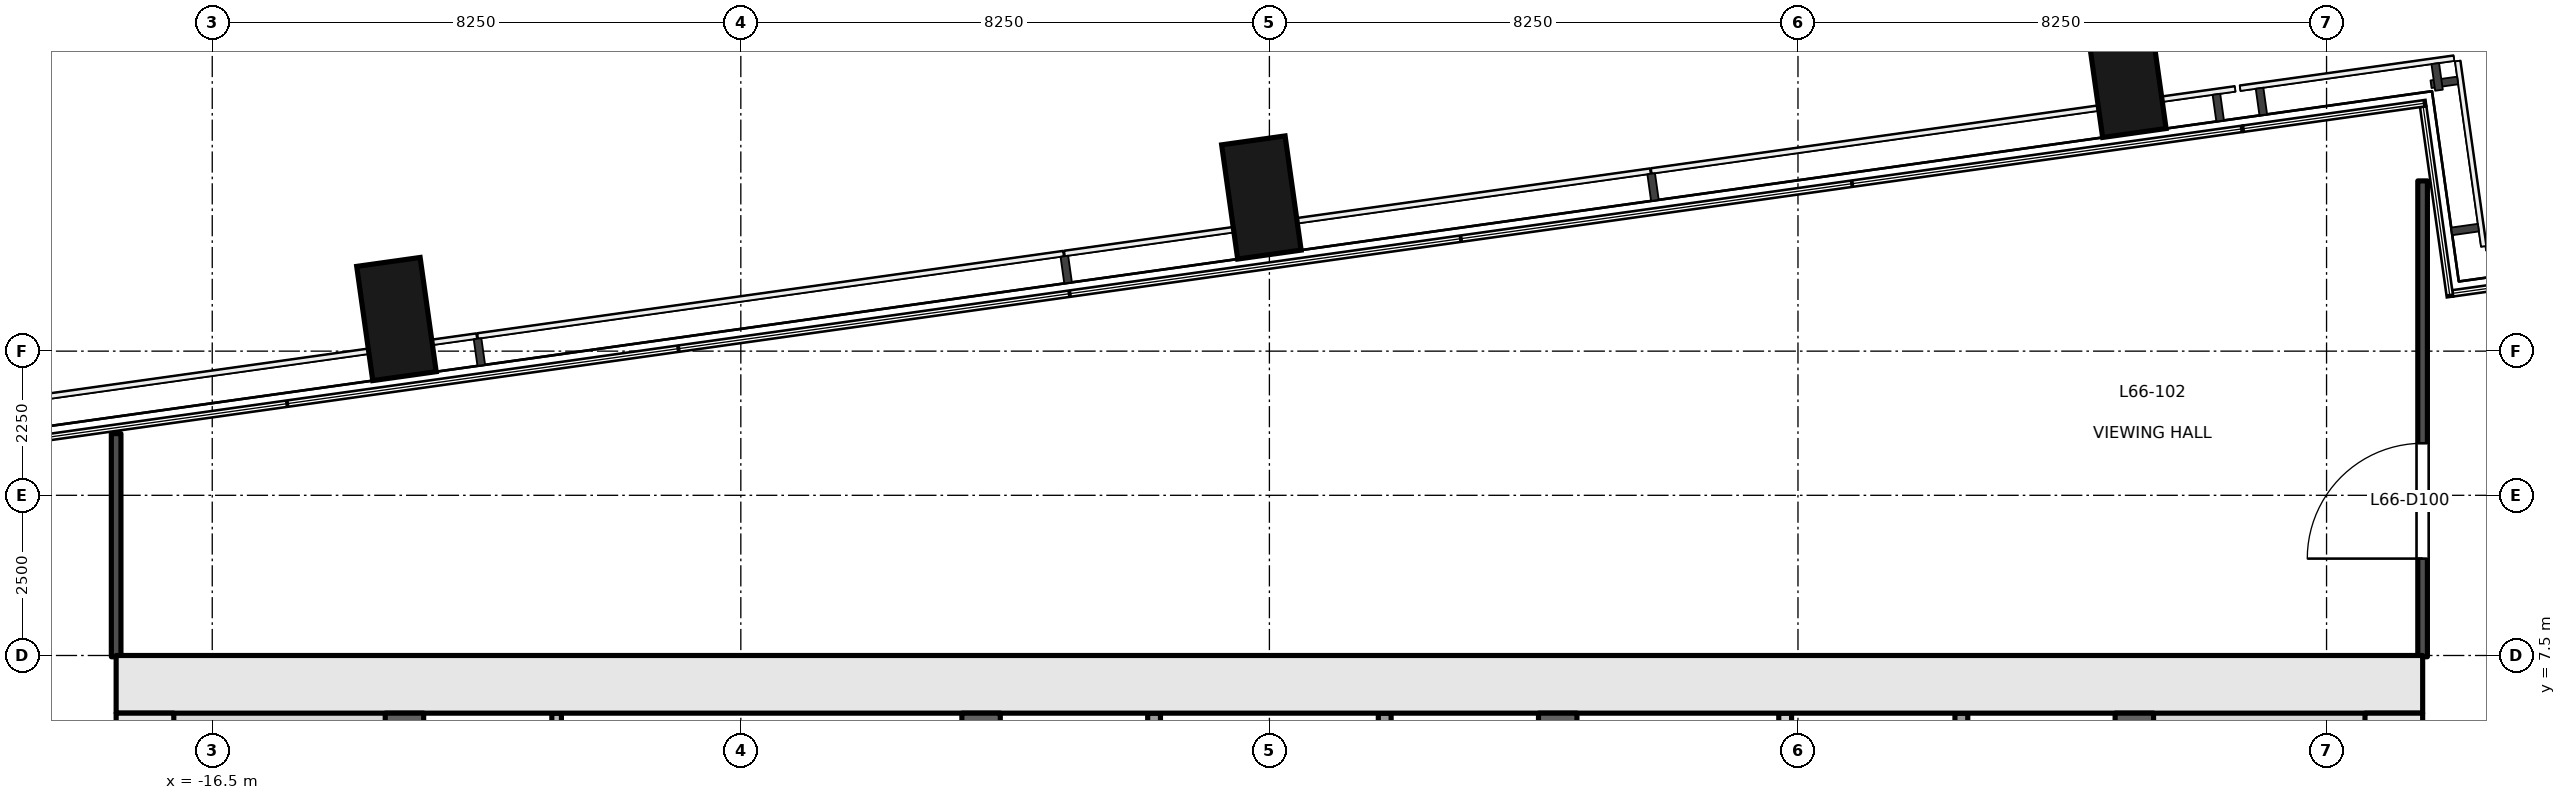
"""IFC4 building model, lengths in metres.
Left out: names, types, materials, properties, quantities, classifications, styles, units other than length and angle.
Written with IfcOpenShell. Run it as: python <this file> out.ifc"""

import sys

from ifc_helpers import new_model, si_unit, direction, frame, frame_2d, origin, origin_2d, place, context, subcontext, project, spatial, rectangle, extrude, element, fill, save


model = new_model("IFC4")
c1 = context("Model", 3, precision=1e-05, world=origin(), true_north=direction((0.0, 1.0)))
c2 = subcontext(c1, "Body", "Model", "MODEL_VIEW")
j1 = project(units=[si_unit("LENGTHUNIT", "METRE"), si_unit("PLANEANGLEUNIT", "RADIAN")], contexts=[c1])
p1 = place(None, origin())
s1 = spatial("IfcSite", under=j1, at=p1, CompositionType="ELEMENT")
p2 = place(p1, origin())
s2 = spatial("IfcBuilding", under=s1, at=p2, CompositionType="ELEMENT")
p3 = place(p2, frame((0.0, 0.0, 286.3)))
s3 = spatial("IfcBuildingStorey", under=s2, at=p3, CompositionType="ELEMENT", Elevation=286.3)
for number, where, z_axis, x_axis in (
    (1, (-13.625, 12.751, -0.2), (0.0, 0.0, 1.0), (0.99, 0.139, 0.0)),
    (2, (-0.125, 14.648, -0.2), (0.0, 0.0, 1.0), (0.99, 0.139, 0.0)),
    (3, (13.375, 16.546, -0.2), (0.0, 0.0, 1.0), (0.99, 0.139, 0.0)),
):
    element("IfcColumn", number, at=place(p3, frame(where, z_axis=z_axis, x_axis=x_axis)), inside=s3, PredefinedType="COLUMN", context=c2, shape_type="SweptSolid", body=[
        extrude(rectangle(XDim=1.0, YDim=1.8, at=origin_2d()), origin(), (0.0, 0.0, 1.0), 6.0),
    ])
p4 = place(p3, frame((-18.0, 7.05, -0.2), z_axis=(0.0, 0.0, 1.0), x_axis=(1.0, 0.0, 0.0)))
e4 = element("IfcWall", 4, at=p4, inside=s3, PredefinedType="SHEAR", context=c2, shape_type="SweptSolid", body=[
    extrude(rectangle(XDim=36.0, YDim=0.9, at=frame_2d((18.0, 0.0))), origin(), (0.0, 0.0, 1.0), 6.0),
])
p5 = place(p3, frame((-17.55, -6.6, -0.2), z_axis=(0.0, 0.0, 1.0), x_axis=(0.0, 1.0, 0.0)))
e5 = element("IfcWall", 5, at=p5, inside=s3, PredefinedType="SHEAR", context=c2, shape_type="SweptSolid", body=[
    extrude(rectangle(XDim=13.2, YDim=0.9, at=frame_2d((6.6, 0.0))), origin(), (0.0, 0.0, 1.0), 6.0),
])
p6 = place(p5, frame((4.55, 0.0, 0.2)))
e6 = element("IfcOpeningElement", 6, at=p6, cuts=e5, PredefinedType="OPENING", context=c2, shape_type="SweptSolid", body=[
    extrude(rectangle(XDim=1.2, YDim=2.1, at=frame_2d((0.6, 1.05))), frame((0.0, 0.46, 0.0), z_axis=(0.0, -1.0, 0.0), x_axis=(1.0, 0.0, 0.0)), (0.0, 0.0, 1.0), 0.921),
])
p7 = place(p3, frame((17.55, -6.6, -0.2), z_axis=(0.0, 0.0, 1.0), x_axis=(0.0, 1.0, 0.0)))
e7 = element("IfcWall", 7, at=p7, inside=s3, PredefinedType="SHEAR", context=c2, shape_type="SweptSolid", body=[
    extrude(rectangle(XDim=13.2, YDim=0.9, at=frame_2d((6.6, 0.0))), origin(), (0.0, 0.0, 1.0), 6.0),
])
p8 = place(p7, frame((4.55, 0.0, 0.2)))
e8 = element("IfcOpeningElement", 8, at=p8, cuts=e7, PredefinedType="OPENING", context=c2, shape_type="SweptSolid", body=[
    extrude(rectangle(XDim=1.2, YDim=2.1, at=frame_2d((0.6, 1.05))), frame((0.0, 0.46, 0.0), z_axis=(0.0, -1.0, 0.0), x_axis=(1.0, 0.0, 0.0)), (0.0, 0.0, 1.0), 0.921),
])
for number, where, z_axis, x_axis in (
    (9, (-13.5, -6.6, -0.2), (0.0, 0.0, 1.0), (0.0, 1.0, 0.0)),
    (10, (-4.5, -6.6, -0.2), (0.0, 0.0, 1.0), (0.0, 1.0, 0.0)),
    (11, (4.5, -6.6, -0.2), (0.0, 0.0, 1.0), (0.0, 1.0, 0.0)),
    (12, (13.5, -6.6, -0.2), (0.0, 0.0, 1.0), (0.0, 1.0, 0.0)),
):
    element("IfcWall", number, at=place(p3, frame(where, z_axis=z_axis, x_axis=x_axis)), inside=s3, PredefinedType="SHEAR", context=c2, shape_type="SweptSolid", body=[
        extrude(rectangle(XDim=13.2, YDim=0.6, at=frame_2d((6.6, 0.0))), origin(), (0.0, 0.0, 1.0), 6.0),
    ])
p9 = place(p3, frame((-11.125, -6.6, 0.0), z_axis=(0.0, 0.0, 1.0), x_axis=(0.0, 1.0, 0.0)))
e13 = element("IfcWall", 13, at=p9, inside=s3, PredefinedType="PARTITIONING", context=c2, shape_type="SweptSolid", body=[
    extrude(rectangle(XDim=13.2, YDim=0.15, at=frame_2d((6.6, 0.0))), origin(), (0.0, 0.0, 1.0), 5.8),
])
p10 = place(p9, frame((2.52, 0.0, 0.0)))
e14 = element("IfcOpeningElement", 14, at=p10, cuts=e13, PredefinedType="OPENING", context=c2, shape_type="SweptSolid", body=[
    extrude(rectangle(XDim=0.9, YDim=2.1, at=frame_2d((0.45, 1.05))), frame((0.0, 0.085, 0.0), z_axis=(0.0, -1.0, 0.0), x_axis=(1.0, 0.0, 0.0)), (0.0, 0.0, 1.0), 0.171),
])
p11 = place(p9, frame((9.12, 0.0, 0.0)))
e15 = element("IfcOpeningElement", 15, at=p11, cuts=e13, PredefinedType="OPENING", context=c2, shape_type="SweptSolid", body=[
    extrude(rectangle(XDim=0.9, YDim=2.1, at=frame_2d((0.45, 1.05))), frame((0.0, 0.085, 0.0), z_axis=(0.0, -1.0, 0.0), x_axis=(1.0, 0.0, 0.0)), (0.0, 0.0, 1.0), 0.171),
])
p12 = place(p3, frame((-1.8, -6.6, 0.0), z_axis=(0.0, 0.0, 1.0), x_axis=(0.0, 1.0, 0.0)))
e16 = element("IfcWall", 16, at=p12, inside=s3, PredefinedType="PARTITIONING", context=c2, shape_type="SweptSolid", body=[
    extrude(rectangle(XDim=13.2, YDim=0.2, at=frame_2d((6.6, 0.0))), origin(), (0.0, 0.0, 1.0), 5.8),
])
p13 = place(p12, frame((0.55, 0.0, 0.0)))
e17 = element("IfcOpeningElement", 17, at=p13, cuts=e16, PredefinedType="OPENING", context=c2, shape_type="SweptSolid", body=[
    extrude(rectangle(XDim=0.9, YDim=2.1, at=frame_2d((0.45, 1.05))), frame((0.0, 0.111, 0.0), z_axis=(0.0, -1.0, 0.0), x_axis=(1.0, 0.0, 0.0)), (0.0, 0.0, 1.0), 0.221),
])
p14 = place(p12, frame((2.9, 0.0, 0.0)))
e18 = element("IfcOpeningElement", 18, at=p14, cuts=e16, PredefinedType="OPENING", context=c2, shape_type="SweptSolid", body=[
    extrude(rectangle(XDim=1.2, YDim=2.1, at=frame_2d((0.6, 1.05))), frame((0.0, 0.111, 0.0), z_axis=(0.0, -1.0, 0.0), x_axis=(1.0, 0.0, 0.0)), (0.0, 0.0, 1.0), 0.221),
])
p15 = place(p12, frame((5.7, 0.0, 0.0)))
e19 = element("IfcOpeningElement", 19, at=p15, cuts=e16, PredefinedType="OPENING", context=c2, shape_type="SweptSolid", body=[
    extrude(rectangle(XDim=1.2, YDim=2.1, at=frame_2d((0.6, 1.05))), frame((0.0, 0.111, 0.0), z_axis=(0.0, -1.0, 0.0), x_axis=(1.0, 0.0, 0.0)), (0.0, 0.0, 1.0), 0.221),
])
p16 = place(p12, frame((8.5, 0.0, 0.0)))
e20 = element("IfcOpeningElement", 20, at=p16, cuts=e16, PredefinedType="OPENING", context=c2, shape_type="SweptSolid", body=[
    extrude(rectangle(XDim=1.2, YDim=2.1, at=frame_2d((0.6, 1.05))), frame((0.0, 0.111, 0.0), z_axis=(0.0, -1.0, 0.0), x_axis=(1.0, 0.0, 0.0)), (0.0, 0.0, 1.0), 0.221),
])
p17 = place(p12, frame((11.3, 0.0, 0.0)))
e21 = element("IfcOpeningElement", 21, at=p17, cuts=e16, PredefinedType="OPENING", context=c2, shape_type="SweptSolid", body=[
    extrude(rectangle(XDim=1.2, YDim=2.1, at=frame_2d((0.6, 1.05))), frame((0.0, 0.111, 0.0), z_axis=(0.0, -1.0, 0.0), x_axis=(1.0, 0.0, 0.0)), (0.0, 0.0, 1.0), 0.221),
])
p18 = place(p3, frame((1.8, -6.6, 0.0), z_axis=(0.0, 0.0, 1.0), x_axis=(0.0, 1.0, 0.0)))
e22 = element("IfcWall", 22, at=p18, inside=s3, PredefinedType="PARTITIONING", context=c2, shape_type="SweptSolid", body=[
    extrude(rectangle(XDim=13.2, YDim=0.2, at=frame_2d((6.6, 0.0))), origin(), (0.0, 0.0, 1.0), 5.8),
])
p19 = place(p18, frame((0.55, 0.0, 0.0)))
e23 = element("IfcOpeningElement", 23, at=p19, cuts=e22, PredefinedType="OPENING", context=c2, shape_type="SweptSolid", body=[
    extrude(rectangle(XDim=0.9, YDim=2.1, at=frame_2d((0.45, 1.05))), frame((0.0, 0.111, 0.0), z_axis=(0.0, -1.0, 0.0), x_axis=(1.0, 0.0, 0.0)), (0.0, 0.0, 1.0), 0.221),
])
p20 = place(p18, frame((2.9, 0.0, 0.0)))
e24 = element("IfcOpeningElement", 24, at=p20, cuts=e22, PredefinedType="OPENING", context=c2, shape_type="SweptSolid", body=[
    extrude(rectangle(XDim=1.2, YDim=2.1, at=frame_2d((0.6, 1.05))), frame((0.0, 0.111, 0.0), z_axis=(0.0, -1.0, 0.0), x_axis=(1.0, 0.0, 0.0)), (0.0, 0.0, 1.0), 0.221),
])
p21 = place(p18, frame((5.7, 0.0, 0.0)))
e25 = element("IfcOpeningElement", 25, at=p21, cuts=e22, PredefinedType="OPENING", context=c2, shape_type="SweptSolid", body=[
    extrude(rectangle(XDim=1.2, YDim=2.1, at=frame_2d((0.6, 1.05))), frame((0.0, 0.111, 0.0), z_axis=(0.0, -1.0, 0.0), x_axis=(1.0, 0.0, 0.0)), (0.0, 0.0, 1.0), 0.221),
])
p22 = place(p18, frame((8.5, 0.0, 0.0)))
e26 = element("IfcOpeningElement", 26, at=p22, cuts=e22, PredefinedType="OPENING", context=c2, shape_type="SweptSolid", body=[
    extrude(rectangle(XDim=1.2, YDim=2.1, at=frame_2d((0.6, 1.05))), frame((0.0, 0.111, 0.0), z_axis=(0.0, -1.0, 0.0), x_axis=(1.0, 0.0, 0.0)), (0.0, 0.0, 1.0), 0.221),
])
p23 = place(p18, frame((11.3, 0.0, 0.0)))
e27 = element("IfcOpeningElement", 27, at=p23, cuts=e22, PredefinedType="OPENING", context=c2, shape_type="SweptSolid", body=[
    extrude(rectangle(XDim=1.2, YDim=2.1, at=frame_2d((0.6, 1.05))), frame((0.0, 0.111, 0.0), z_axis=(0.0, -1.0, 0.0), x_axis=(1.0, 0.0, 0.0)), (0.0, 0.0, 1.0), 0.221),
])
p24 = place(p3, frame((8.05, -6.6, 0.0), z_axis=(0.0, 0.0, 1.0), x_axis=(0.0, 1.0, 0.0)))
e28 = element("IfcWall", 28, at=p24, inside=s3, PredefinedType="PARTITIONING", context=c2, shape_type="SweptSolid", body=[
    extrude(rectangle(XDim=13.2, YDim=0.2, at=frame_2d((6.6, 0.0))), origin(), (0.0, 0.0, 1.0), 5.8),
])
p25 = place(p24, frame((1.386, 0.0, 0.0)))
e29 = element("IfcOpeningElement", 29, at=p25, cuts=e28, PredefinedType="OPENING", context=c2, shape_type="SweptSolid", body=[
    extrude(rectangle(XDim=0.9, YDim=2.1, at=frame_2d((0.45, 1.05))), frame((0.0, 0.111, 0.0), z_axis=(0.0, -1.0, 0.0), x_axis=(1.0, 0.0, 0.0)), (0.0, 0.0, 1.0), 0.221),
])
p26 = place(p24, frame((4.786, 0.0, 0.0)))
e30 = element("IfcOpeningElement", 30, at=p26, cuts=e28, PredefinedType="OPENING", context=c2, shape_type="SweptSolid", body=[
    extrude(rectangle(XDim=0.9, YDim=2.1, at=frame_2d((0.45, 1.05))), frame((0.0, 0.111, 0.0), z_axis=(0.0, -1.0, 0.0), x_axis=(1.0, 0.0, 0.0)), (0.0, 0.0, 1.0), 0.221),
])
p27 = place(p24, frame((11.9, 0.0, 0.0)))
e31 = element("IfcOpeningElement", 31, at=p27, cuts=e28, PredefinedType="OPENING", context=c2, shape_type="SweptSolid", body=[
    extrude(rectangle(XDim=1.1, YDim=2.1, at=frame_2d((0.55, 1.05))), frame((0.0, 0.111, 0.0), z_axis=(0.0, -1.0, 0.0), x_axis=(1.0, 0.0, 0.0)), (0.0, 0.0, 1.0), 0.221),
])
p28 = place(p3, frame((10.8, -6.6, 0.0), z_axis=(0.0, 0.0, 1.0), x_axis=(0.0, 1.0, 0.0)))
e32 = element("IfcWall", 32, at=p28, inside=s3, PredefinedType="PARTITIONING", context=c2, shape_type="SweptSolid", body=[
    extrude(rectangle(XDim=13.2, YDim=0.2, at=frame_2d((6.6, 0.0))), origin(), (0.0, 0.0, 1.0), 5.8),
])
p29 = place(p28, frame((0.7, 0.0, 0.0)))
e33 = element("IfcOpeningElement", 33, at=p29, cuts=e32, PredefinedType="OPENING", context=c2, shape_type="SweptSolid", body=[
    extrude(rectangle(XDim=1.2, YDim=2.1, at=frame_2d((0.6, 1.05))), frame((0.0, 0.111, 0.0), z_axis=(0.0, -1.0, 0.0), x_axis=(1.0, 0.0, 0.0)), (0.0, 0.0, 1.0), 0.221),
])
p30 = place(p28, frame((3.5, 0.0, 0.0)))
e34 = element("IfcOpeningElement", 34, at=p30, cuts=e32, PredefinedType="OPENING", context=c2, shape_type="SweptSolid", body=[
    extrude(rectangle(XDim=1.2, YDim=2.1, at=frame_2d((0.6, 1.05))), frame((0.0, 0.111, 0.0), z_axis=(0.0, -1.0, 0.0), x_axis=(1.0, 0.0, 0.0)), (0.0, 0.0, 1.0), 0.221),
])
p31 = place(p28, frame((6.3, 0.0, 0.0)))
e35 = element("IfcOpeningElement", 35, at=p31, cuts=e32, PredefinedType="OPENING", context=c2, shape_type="SweptSolid", body=[
    extrude(rectangle(XDim=1.2, YDim=2.1, at=frame_2d((0.6, 1.05))), frame((0.0, 0.111, 0.0), z_axis=(0.0, -1.0, 0.0), x_axis=(1.0, 0.0, 0.0)), (0.0, 0.0, 1.0), 0.221),
])
p32 = place(p28, frame((8.742, 0.0, 0.0)))
e36 = element("IfcOpeningElement", 36, at=p32, cuts=e32, PredefinedType="OPENING", context=c2, shape_type="SweptSolid", body=[
    extrude(rectangle(XDim=0.9, YDim=2.1, at=frame_2d((0.45, 1.05))), frame((0.0, 0.111, 0.0), z_axis=(0.0, -1.0, 0.0), x_axis=(1.0, 0.0, 0.0)), (0.0, 0.0, 1.0), 0.221),
])
p33 = place(p28, frame((10.326, 0.0, 0.0)))
e37 = element("IfcOpeningElement", 37, at=p33, cuts=e32, PredefinedType="OPENING", context=c2, shape_type="SweptSolid", body=[
    extrude(rectangle(XDim=0.9, YDim=2.1, at=frame_2d((0.45, 1.05))), frame((0.0, 0.111, 0.0), z_axis=(0.0, -1.0, 0.0), x_axis=(1.0, 0.0, 0.0)), (0.0, 0.0, 1.0), 0.221),
])
p34 = place(p28, frame((11.934, 0.0, 0.0)))
e38 = element("IfcOpeningElement", 38, at=p34, cuts=e32, PredefinedType="OPENING", context=c2, shape_type="SweptSolid", body=[
    extrude(rectangle(XDim=0.9, YDim=2.1, at=frame_2d((0.45, 1.05))), frame((0.0, 0.111, 0.0), z_axis=(0.0, -1.0, 0.0), x_axis=(1.0, 0.0, 0.0)), (0.0, 0.0, 1.0), 0.221),
])
p35 = place(p3, frame((-18.0, 10.963, 0.0), z_axis=(0.0, 0.0, 1.0), x_axis=(0.0, -1.0, 0.0)))
e39 = element("IfcWall", 39, at=p35, inside=s3, PredefinedType="PARTITIONING", context=c2, shape_type="SweptSolid", body=[
    extrude(rectangle(XDim=3.483, YDim=0.15, at=frame_2d((1.741, 0.0))), origin(), (0.0, 0.0, 1.0), 5.8),
])
p36 = place(p3, frame((17.999, 7.48, 0.0), z_axis=(0.0, 0.0, 1.0), x_axis=(0.0, 1.0, 0.0)))
e40 = element("IfcWall", 40, at=p36, inside=s3, PredefinedType="PARTITIONING", context=c2, shape_type="SweptSolid", body=[
    extrude(rectangle(XDim=7.427, YDim=0.15, at=frame_2d((3.713, 0.0))), origin(), (0.0, 0.0, 1.0), 5.8),
])
p37 = place(p36, frame((1.532, 0.0, 0.0)))
e41 = element("IfcOpeningElement", 41, at=p37, cuts=e40, PredefinedType="OPENING", context=c2, shape_type="SweptSolid", body=[
    extrude(rectangle(XDim=1.8, YDim=2.1, at=frame_2d((0.9, 1.05))), frame((0.0, 0.085, 0.0), z_axis=(0.0, -1.0, 0.0), x_axis=(1.0, 0.0, 0.0)), (0.0, 0.0, 1.0), 0.171),
])
p38 = place(p37, origin())
e42 = element("IfcDoor", 42, at=p38, inside=s3, OperationType="DOUBLE_DOOR_SINGLE_SWING", PredefinedType="DOOR", context=c2, shape_type="SweptSolid", body=[
    extrude(rectangle(XDim=1.8, YDim=2.1, at=frame_2d((0.9, 1.05))), frame((0.0, 0.025, 0.0), z_axis=(0.0, -1.0, 0.0), x_axis=(1.0, 0.0, 0.0)), (0.0, 0.0, 1.0), 0.05),
])
fill(e41, e42)
save(model, sys.argv[1])
